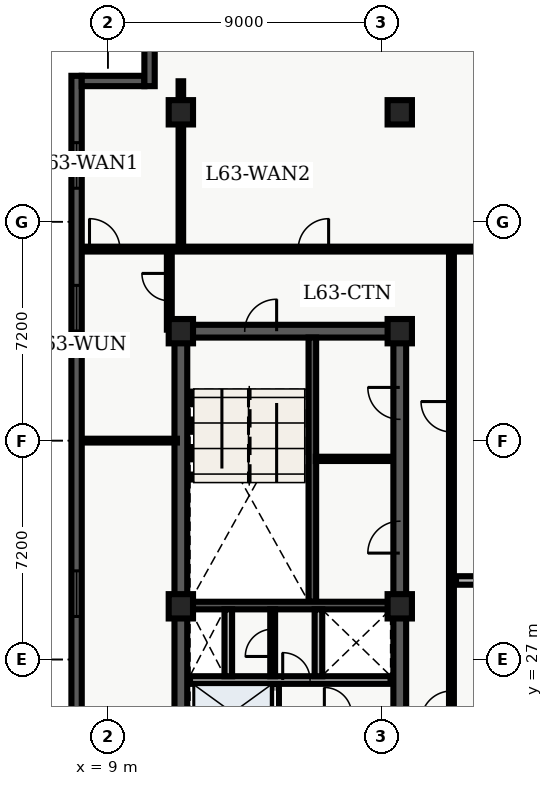
"""IFC4 building model, lengths in metres.
Left out: names, types, materials, properties, quantities, classifications, styles, units other than length and angle.
Written with IfcOpenShell. Run it as: python <this file> out.ifc"""

import sys

from ifc_helpers import new_model, entity, si_unit, converted_unit, direction, frame, origin_with_axes, origin_2d_with_axis, place, context, subcontext, project, spatial, polyline, rectangle, outline, extrude, element, fill, save


model = new_model("IFC4")
c1 = context("Model", 3, precision=1e-05, world=origin_with_axes(), true_north=direction((0.0, 1.0)))
c2 = subcontext(c1, "Body", "Model", "MODEL_VIEW")
j1 = project(units=[si_unit("LENGTHUNIT", "METRE"), converted_unit("PLANEANGLEUNIT", "DEGREE", entity("IfcPlaneAngleMeasure", 0.017), si_unit("PLANEANGLEUNIT", "RADIAN"), dimensions=[0, 0, 0, 0, 0, 0, 0])], contexts=[c1])
p1 = place(None, origin_with_axes())
s1 = spatial("IfcSite", under=j1, at=p1, CompositionType="ELEMENT")
p2 = place(p1, origin_with_axes())
s2 = spatial("IfcBuilding", under=s1, at=p2, CompositionType="ELEMENT")
p3 = place(p2, frame((0.0, 0.0, 256.8), z_axis=(0.0, 0.0, 1.0), x_axis=(1.0, 0.0, 0.0)))
s3 = spatial("IfcBuildingStorey", under=s2, at=p3, CompositionType="ELEMENT", Elevation=256.8)
p4 = place(p3, frame((11.4, 10.8, 0.0), z_axis=(0.0, 0.0, 1.0), x_axis=(0.0, 1.0, 0.0)))
e1 = element("IfcWall", 1, at=p4, inside=s3, PredefinedType="SHEAR", context=c2, shape_type="SweptSolid", body=[
    extrude(outline(polyline([(0.0, -0.21), (27.0, -0.21), (27.0, 0.21), (0.0, 0.21), (0.0, -0.21)])), origin_with_axes(), (0.0, 0.0, 1.0), 3.66),
])
p5 = place(p3, frame((11.4, 37.8, 0.0), z_axis=(0.0, 0.0, 1.0), x_axis=(1.0, 0.0, 0.0)))
e2 = element("IfcWall", 2, at=p5, inside=s3, PredefinedType="SHEAR", context=c2, shape_type="SweptSolid", body=[
    extrude(outline(polyline([(0.0, -0.21), (7.2, -0.21), (7.2, 0.21), (0.0, 0.21), (0.0, -0.21)])), origin_with_axes(), (0.0, 0.0, 1.0), 3.66),
])
p6 = place(p5, frame((2.625, 0.0, 0.0), z_axis=(0.0, 0.0, 1.0), x_axis=(1.0, 0.0, 0.0)))
e3 = element("IfcOpeningElement", 3, at=p6, cuts=e2, PredefinedType="OPENING", context=c2, shape_type="SweptSolid", body=[
    extrude(rectangle(XDim=1.05, YDim=0.44, at=origin_2d_with_axis()), origin_with_axes(), (0.0, 0.0, 1.0), 2.15),
])
p7 = place(p3, frame((18.6, 24.3, 0.0), z_axis=(0.0, 0.0, 1.0), x_axis=(0.0, 1.0, 0.0)))
e4 = element("IfcWall", 4, at=p7, inside=s3, PredefinedType="SHEAR", context=c2, shape_type="SweptSolid", body=[
    extrude(outline(polyline([(0.0, -0.21), (13.5, -0.21), (13.5, 0.21), (0.0, 0.21), (0.0, -0.21)])), origin_with_axes(), (0.0, 0.0, 1.0), 3.66),
])
p8 = place(p7, frame((6.725, 0.0, 0.0), z_axis=(0.0, 0.0, 1.0), x_axis=(1.0, 0.0, 0.0)))
e5 = element("IfcOpeningElement", 5, at=p8, cuts=e4, PredefinedType="OPENING", context=c2, shape_type="SweptSolid", body=[
    extrude(rectangle(XDim=1.05, YDim=0.44, at=origin_2d_with_axis()), origin_with_axes(), (0.0, 0.0, 1.0), 2.15),
])
p9 = place(p7, frame((11.125, 0.0, 0.0), z_axis=(0.0, 0.0, 1.0), x_axis=(1.0, 0.0, 0.0)))
e6 = element("IfcOpeningElement", 6, at=p9, cuts=e4, PredefinedType="OPENING", context=c2, shape_type="SweptSolid", body=[
    extrude(rectangle(XDim=1.05, YDim=0.44, at=origin_2d_with_axis()), origin_with_axes(), (0.0, 0.0, 1.0), 2.15),
])
p10 = place(p3, frame((15.725, 28.9, 0.0), z_axis=(0.0, 0.0, 1.0), x_axis=(0.0, 1.0, 0.0)))
e7 = element("IfcWall", 7, at=p10, inside=s3, PredefinedType="SHEAR", context=c2, shape_type="SweptSolid", body=[
    extrude(outline(polyline([(0.0, -0.125), (8.69, -0.125), (8.69, 0.125), (0.0, 0.125), (0.0, -0.125)])), origin_with_axes(), (0.0, 0.0, 1.0), 3.66),
])
p11 = place(p3, frame((11.61, 28.775, 0.0), z_axis=(0.0, 0.0, 1.0), x_axis=(1.0, 0.0, 0.0)))
e8 = element("IfcWall", 8, at=p11, inside=s3, PredefinedType="SHEAR", context=c2, shape_type="SweptSolid", body=[
    extrude(outline(polyline([(0.0, -0.125), (6.78, -0.125), (6.78, 0.125), (0.0, 0.125), (0.0, -0.125)])), origin_with_axes(), (0.0, 0.0, 1.0), 3.66),
])
p12 = place(p3, frame((14.5, 19.95, 0.0), z_axis=(0.0, 0.0, 1.0), x_axis=(0.0, 1.0, 0.0)))
e9 = element("IfcWall", 9, at=p12, inside=s3, PredefinedType="SOLIDWALL", context=c2, shape_type="SweptSolid", body=[
    extrude(outline(polyline([(0.0, -0.125), (6.25, -0.125), (6.25, 0.125), (0.0, 0.125), (0.0, -0.125)])), origin_with_axes(), (0.0, 0.0, 1.0), 2.7),
])
p13 = place(p12, frame((1.025, 0.0, 0.0), z_axis=(0.0, 0.0, 1.0), x_axis=(1.0, 0.0, 0.0)))
e10 = element("IfcOpeningElement", 10, at=p13, cuts=e9, PredefinedType="OPENING", context=c2, shape_type="SweptSolid", body=[
    extrude(rectangle(XDim=1.1, YDim=0.27, at=origin_2d_with_axis()), origin_with_axes(), (0.0, 0.0, 1.0), 2.15),
])
p14 = place(p12, frame((2.975, 0.0, 0.0), z_axis=(0.0, 0.0, 1.0), x_axis=(1.0, 0.0, 0.0)))
e11 = element("IfcOpeningElement", 11, at=p14, cuts=e9, PredefinedType="OPENING", context=c2, shape_type="SweptSolid", body=[
    extrude(rectangle(XDim=1.1, YDim=0.27, at=origin_2d_with_axis()), origin_with_axes(), (0.0, 0.0, 1.0), 2.15),
])
p15 = place(p12, frame((5.425, 0.0, 0.0), z_axis=(0.0, 0.0, 1.0), x_axis=(1.0, 0.0, 0.0)))
e12 = element("IfcOpeningElement", 12, at=p15, cuts=e9, PredefinedType="OPENING", context=c2, shape_type="SweptSolid", body=[
    extrude(rectangle(XDim=1.2, YDim=0.27, at=origin_2d_with_axis()), origin_with_axes(), (0.0, 0.0, 1.0), 2.15),
])
p16 = place(p3, frame((11.7, 26.325, 0.0), z_axis=(0.0, 0.0, 1.0), x_axis=(1.0, 0.0, 0.0)))
e13 = element("IfcWall", 13, at=p16, inside=s3, PredefinedType="SOLIDWALL", context=c2, shape_type="SweptSolid", body=[
    extrude(outline(polyline([(0.0, -0.125), (6.6, -0.125), (6.6, 0.125), (0.0, 0.125), (0.0, -0.125)])), origin_with_axes(), (0.0, 0.0, 1.0), 2.7),
])
p17 = place(p16, frame((3.5, 0.0, 0.0), z_axis=(0.0, 0.0, 1.0), x_axis=(1.0, 0.0, 0.0)))
e14 = element("IfcOpeningElement", 14, at=p17, cuts=e13, PredefinedType="OPENING", context=c2, shape_type="SweptSolid", body=[
    extrude(rectangle(XDim=0.9, YDim=0.27, at=origin_2d_with_axis()), origin_with_axes(), (0.0, 0.0, 1.0), 2.15),
])
for number, where, z_axis, x_axis in (
    (15, (12.96, 26.45, 0.0), (0.0, 0.0, 1.0), (0.0, 1.0, 0.0)),
    (16, (15.925, 26.45, 0.0), (0.0, 0.0, 1.0), (0.0, 1.0, 0.0)),
):
    element("IfcWall", number, at=place(p3, frame(where, z_axis=z_axis, x_axis=x_axis)), inside=s3, PredefinedType="SOLIDWALL", context=c2, shape_type="SweptSolid", body=[
        extrude(outline(polyline([(0.0, -0.125), (2.2, -0.125), (2.2, 0.125), (0.0, 0.125), (0.0, -0.125)])), origin_with_axes(), (0.0, 0.0, 1.0), 2.7),
    ])
for number, where, z_axis, x_axis in (
    (17, (11.4, 28.75, 0.0), (0.0, 0.0, 1.0), (1.0, 0.0, 0.0)),
    (18, (11.4, 37.8, 0.0), (0.0, 0.0, 1.0), (1.0, 0.0, 0.0)),
    (19, (11.4, 45.0, 0.0), (0.0, 0.0, 1.0), (1.0, 0.0, 0.0)),
    (20, (18.6, 28.75, 0.0), (0.0, 0.0, 1.0), (1.0, 0.0, 0.0)),
    (21, (18.6, 37.8, 0.0), (0.0, 0.0, 1.0), (1.0, 0.0, 0.0)),
    (22, (18.6, 45.0, 0.0), (0.0, 0.0, 1.0), (1.0, 0.0, 0.0)),
):
    element("IfcColumn", number, at=place(p3, frame(where, z_axis=z_axis, x_axis=x_axis)), inside=s3, PredefinedType="COLUMN", context=c2, shape_type="SweptSolid", body=[
        extrude(rectangle(XDim=0.8, YDim=0.8, at=origin_2d_with_axis()), origin_with_axes(), (0.0, 0.0, 1.0), 3.9),
    ])
p18 = place(p3, frame((14.42, 26.45, 0.0), z_axis=(0.0, 0.0, 1.0), x_axis=(0.0, 1.0, 0.0)))
e23 = element("IfcWall", 23, at=p18, inside=s3, PredefinedType="PARTITIONING", context=c2, shape_type="SweptSolid", body=[
    extrude(outline(polyline([(0.0, -0.08), (2.2, -0.08), (2.2, 0.08), (0.0, 0.08), (0.0, -0.08)])), origin_with_axes(), (0.0, 0.0, 1.0), 2.7),
])
p19 = place(p18, frame((1.1, 0.0, 0.0), z_axis=(0.0, 0.0, 1.0), x_axis=(1.0, 0.0, 0.0)))
e24 = element("IfcOpeningElement", 24, at=p19, cuts=e23, PredefinedType="OPENING", context=c2, shape_type="SweptSolid", body=[
    extrude(rectangle(XDim=0.9, YDim=0.18, at=origin_2d_with_axis()), origin_with_axes(), (0.0, 0.0, 1.0), 2.15),
])
p20 = place(p3, frame((15.84, 33.6, 0.0), z_axis=(0.0, 0.0, 1.0), x_axis=(1.0, 0.0, 0.0)))
e25 = element("IfcWall", 25, at=p20, inside=s3, PredefinedType="PARTITIONING", context=c2, shape_type="SweptSolid", body=[
    extrude(outline(polyline([(0.0, -0.07), (2.46, -0.07), (2.46, 0.07), (0.0, 0.07), (0.0, -0.07)])), origin_with_axes(), (0.0, 0.0, 1.0), 2.7),
])
p21 = place(p3, frame((8.135, 40.5, 0.0), z_axis=(0.0, 0.0, 1.0), x_axis=(1.0, 0.0, 0.0)))
e26 = element("IfcWall", 26, at=p21, inside=s3, PredefinedType="PARTITIONING", context=c2, shape_type="SweptSolid", body=[
    extrude(outline(polyline([(0.0, -0.08), (23.93, -0.08), (23.93, 0.08), (0.0, 0.08), (0.0, -0.08)])), origin_with_axes(), (0.0, 0.0, 1.0), 2.7),
])
p22 = place(p21, frame((0.76, 0.0, 0.0), z_axis=(0.0, 0.0, 1.0), x_axis=(1.0, 0.0, 0.0)))
e27 = element("IfcOpeningElement", 27, at=p22, cuts=e26, PredefinedType="OPENING", context=c2, shape_type="SweptSolid", body=[
    extrude(rectangle(XDim=1.0, YDim=0.18, at=origin_2d_with_axis()), origin_with_axes(), (0.0, 0.0, 1.0), 2.15),
])
p23 = place(p21, frame((7.625, 0.0, 0.0), z_axis=(0.0, 0.0, 1.0), x_axis=(1.0, 0.0, 0.0)))
e28 = element("IfcOpeningElement", 28, at=p23, cuts=e26, PredefinedType="OPENING", context=c2, shape_type="SweptSolid", body=[
    extrude(rectangle(XDim=1.0, YDim=0.18, at=origin_2d_with_axis()), origin_with_axes(), (0.0, 0.0, 1.0), 2.15),
])
p24 = place(p3, frame((20.3, 7.8, 0.0), z_axis=(0.0, 0.0, 1.0), x_axis=(0.0, 1.0, 0.0)))
e29 = element("IfcWall", 29, at=p24, inside=s3, PredefinedType="PARTITIONING", context=c2, shape_type="SweptSolid", body=[
    extrude(outline(polyline([(0.0, -0.08), (32.7, -0.08), (32.7, 0.08), (0.0, 0.08), (0.0, -0.08)])), origin_with_axes(), (0.0, 0.0, 1.0), 2.7),
])
p25 = place(p24, frame((17.665, 0.0, 0.0), z_axis=(0.0, 0.0, 1.0), x_axis=(1.0, 0.0, 0.0)))
e30 = element("IfcOpeningElement", 30, at=p25, cuts=e29, PredefinedType="OPENING", context=c2, shape_type="SweptSolid", body=[
    extrude(rectangle(XDim=1.0, YDim=0.18, at=origin_2d_with_axis()), origin_with_axes(), (0.0, 0.0, 1.0), 2.15),
])
p26 = place(p24, frame((27.185, 0.0, 0.0), z_axis=(0.0, 0.0, 1.0), x_axis=(1.0, 0.0, 0.0)))
e31 = element("IfcOpeningElement", 31, at=p26, cuts=e29, PredefinedType="OPENING", context=c2, shape_type="SweptSolid", body=[
    extrude(rectangle(XDim=1.0, YDim=0.18, at=origin_2d_with_axis()), origin_with_axes(), (0.0, 0.0, 1.0), 2.15),
])
p27 = place(p24, frame((5.775, 0.0, 0.0), z_axis=(0.0, 0.0, 1.0), x_axis=(1.0, 0.0, 0.0)))
e32 = element("IfcOpeningElement", 32, at=p27, cuts=e29, PredefinedType="OPENING", context=c2, shape_type="SweptSolid", body=[
    extrude(rectangle(XDim=1.05, YDim=0.18, at=origin_2d_with_axis()), origin_with_axes(), (0.0, 0.0, 1.0), 2.15),
])
p28 = place(p3, frame((11.02, 37.85, 0.0), z_axis=(0.0, 0.0, 1.0), x_axis=(0.0, 1.0, 0.0)))
e33 = element("IfcWall", 33, at=p28, inside=s3, PredefinedType="PARTITIONING", context=c2, shape_type="SweptSolid", body=[
    extrude(outline(polyline([(0.0, -0.08), (2.65, -0.08), (2.65, 0.08), (0.0, 0.08), (0.0, -0.08)])), origin_with_axes(), (0.0, 0.0, 1.0), 2.7),
])
p29 = place(p28, frame((1.4, 0.0, 0.0), z_axis=(0.0, 0.0, 1.0), x_axis=(1.0, 0.0, 0.0)))
e34 = element("IfcOpeningElement", 34, at=p29, cuts=e33, PredefinedType="OPENING", context=c2, shape_type="SweptSolid", body=[
    extrude(rectangle(XDim=0.9, YDim=0.18, at=origin_2d_with_axis()), origin_with_axes(), (0.0, 0.0, 1.0), 2.15),
])
p30 = place(p3, frame((8.135, 34.2, 0.0), z_axis=(0.0, 0.0, 1.0), x_axis=(1.0, 0.0, 0.0)))
e35 = element("IfcWall", 35, at=p30, inside=s3, PredefinedType="PARTITIONING", context=c2, shape_type="SweptSolid", body=[
    extrude(outline(polyline([(0.0, -0.062), (3.135, -0.062), (3.135, 0.062), (0.0, 0.062), (0.0, -0.062)])), origin_with_axes(), (0.0, 0.0, 1.0), 2.7),
])
p31 = place(p3, frame((11.4, 40.6, 0.0), z_axis=(0.0, 0.0, 1.0), x_axis=(0.0, 1.0, 0.0)))
e36 = element("IfcWall", 36, at=p31, inside=s3, PredefinedType="PARTITIONING", context=c2, shape_type="SweptSolid", body=[
    extrude(outline(polyline([(0.0, -0.075), (5.42, -0.075), (5.42, 0.075), (0.0, 0.075), (0.0, -0.075)])), origin_with_axes(), (0.0, 0.0, 1.0), 2.7),
])
p32 = place(p3, frame((20.45, 29.6, 0.0), z_axis=(0.0, 0.0, 1.0), x_axis=(1.0, 0.0, 0.0)))
e37 = element("IfcWall", 37, at=p32, inside=s3, PredefinedType="PARTITIONING", context=c2, shape_type="SweptSolid", body=[
    extrude(outline(polyline([(0.0, -0.14), (11.615, -0.14), (11.615, 0.14), (0.0, 0.14), (0.0, -0.14)])), origin_with_axes(), (0.0, 0.0, 1.0), 2.7),
])
p33 = place(p3, frame((7.97, 2.74, 0.0), z_axis=(0.0, 0.0, 1.0), x_axis=(0.0, 1.0, 0.0)))
e38 = element("IfcWall", 38, at=p33, inside=s3, PredefinedType="SOLIDWALL", context=c2, shape_type="SweptSolid", body=[
    extrude(outline(polyline([(0.0, -0.17), (43.46, -0.17), (43.46, 0.17), (0.0, 0.17), (0.0, -0.17)])), origin_with_axes(), (0.0, 0.0, 1.0), 3.66),
])
p34 = place(p33, frame((2.948, 0.0, 0.45), z_axis=(0.0, 0.0, 1.0), x_axis=(1.0, 0.0, 0.0)))
e39 = element("IfcOpeningElement", 39, at=p34, cuts=e38, PredefinedType="OPENING", context=c2, shape_type="SweptSolid", body=[
    extrude(rectangle(XDim=1.5, YDim=0.36, at=origin_2d_with_axis()), origin_with_axes(), (0.0, 0.0, 1.0), 2.1),
])
p35 = place(p33, frame((7.643, 0.0, 0.45), z_axis=(0.0, 0.0, 1.0), x_axis=(1.0, 0.0, 0.0)))
e40 = element("IfcOpeningElement", 40, at=p35, cuts=e38, PredefinedType="OPENING", context=c2, shape_type="SweptSolid", body=[
    extrude(rectangle(XDim=1.5, YDim=0.36, at=origin_2d_with_axis()), origin_with_axes(), (0.0, 0.0, 1.0), 2.1),
])
p36 = place(p33, frame((13.189, 0.0, 0.45), z_axis=(0.0, 0.0, 1.0), x_axis=(1.0, 0.0, 0.0)))
e41 = element("IfcOpeningElement", 41, at=p36, cuts=e38, PredefinedType="OPENING", context=c2, shape_type="SweptSolid", body=[
    extrude(rectangle(XDim=1.5, YDim=0.36, at=origin_2d_with_axis()), origin_with_axes(), (0.0, 0.0, 1.0), 2.1),
])
p37 = place(p33, frame((17.034, 0.0, 0.45), z_axis=(0.0, 0.0, 1.0), x_axis=(1.0, 0.0, 0.0)))
e42 = element("IfcOpeningElement", 42, at=p37, cuts=e38, PredefinedType="OPENING", context=c2, shape_type="SweptSolid", body=[
    extrude(rectangle(XDim=1.5, YDim=0.36, at=origin_2d_with_axis()), origin_with_axes(), (0.0, 0.0, 1.0), 2.1),
])
p38 = place(p33, frame((21.73, 0.0, 0.45), z_axis=(0.0, 0.0, 1.0), x_axis=(1.0, 0.0, 0.0)))
e43 = element("IfcOpeningElement", 43, at=p38, cuts=e38, PredefinedType="OPENING", context=c2, shape_type="SweptSolid", body=[
    extrude(rectangle(XDim=1.5, YDim=0.36, at=origin_2d_with_axis()), origin_with_axes(), (0.0, 0.0, 1.0), 2.1),
])
p39 = place(p33, frame((26.426, 0.0, 0.45), z_axis=(0.0, 0.0, 1.0), x_axis=(1.0, 0.0, 0.0)))
e44 = element("IfcOpeningElement", 44, at=p39, cuts=e38, PredefinedType="OPENING", context=c2, shape_type="SweptSolid", body=[
    extrude(rectangle(XDim=1.5, YDim=0.36, at=origin_2d_with_axis()), origin_with_axes(), (0.0, 0.0, 1.0), 2.1),
])
p40 = place(p33, frame((35.817, 0.0, 0.45), z_axis=(0.0, 0.0, 1.0), x_axis=(1.0, 0.0, 0.0)))
e45 = element("IfcOpeningElement", 45, at=p40, cuts=e38, PredefinedType="OPENING", context=c2, shape_type="SweptSolid", body=[
    extrude(rectangle(XDim=1.5, YDim=0.36, at=origin_2d_with_axis()), origin_with_axes(), (0.0, 0.0, 1.0), 2.1),
])
p41 = place(p33, frame((40.512, 0.0, 0.45), z_axis=(0.0, 0.0, 1.0), x_axis=(1.0, 0.0, 0.0)))
e46 = element("IfcOpeningElement", 46, at=p41, cuts=e38, PredefinedType="OPENING", context=c2, shape_type="SweptSolid", body=[
    extrude(rectangle(XDim=1.5, YDim=0.36, at=origin_2d_with_axis()), origin_with_axes(), (0.0, 0.0, 1.0), 2.1),
])
p42 = place(p3, frame((8.14, 46.03, 0.0), z_axis=(0.0, 0.0, 1.0), x_axis=(1.0, 0.0, 0.0)))
e47 = element("IfcWall", 47, at=p42, inside=s3, PredefinedType="SOLIDWALL", context=c2, shape_type="SweptSolid", body=[
    extrude(outline(polyline([(0.0, -0.17), (2.06, -0.17), (2.06, 0.17), (0.0, 0.17), (0.0, -0.17)])), origin_with_axes(), (0.0, 0.0, 1.0), 3.66),
])
p43 = place(p3, frame((10.37, 45.86, 0.0), z_axis=(0.0, 0.0, 1.0), x_axis=(0.0, 1.0, 0.0)))
e48 = element("IfcWall", 48, at=p43, inside=s3, PredefinedType="SOLIDWALL", context=c2, shape_type="SweptSolid", body=[
    extrude(outline(polyline([(0.0, -0.17), (2.74, -0.17), (2.74, 0.17), (0.0, 0.17), (0.0, -0.17)])), origin_with_axes(), (0.0, 0.0, 1.0), 3.66),
])
p44 = place(p12, frame((5.425, 0.0, 0.0), z_axis=(0.0, 0.0, 1.0), x_axis=(1.0, 0.0, 0.0)))
e49 = element("IfcDoor", 49, at=p44, inside=s3, OperationType="DOUBLE_DOOR_SLIDING", PredefinedType="DOOR", context=c2, shape_type="SweptSolid", body=[
    extrude(rectangle(XDim=1.2, YDim=0.09, at=origin_2d_with_axis()), origin_with_axes(), (0.0, 0.0, 1.0), 2.15),
])
fill(e12, e49)
p45 = place(p5, frame((2.625, 0.0, 0.0), z_axis=(0.0, 0.0, 1.0), x_axis=(1.0, 0.0, 0.0)))
e50 = element("IfcDoor", 50, at=p45, inside=s3, OperationType="SINGLE_SWING_RIGHT", PredefinedType="DOOR", context=c2, shape_type="SweptSolid", body=[
    extrude(rectangle(XDim=1.05, YDim=0.09, at=origin_2d_with_axis()), origin_with_axes(), (0.0, 0.0, 1.0), 2.15),
])
fill(e3, e50)
p46 = place(p16, frame((3.5, 0.0, 0.0), z_axis=(0.0, 0.0, 1.0), x_axis=(1.0, 0.0, 0.0)))
e51 = element("IfcDoor", 51, at=p46, inside=s3, OperationType="SINGLE_SWING_LEFT", PredefinedType="DOOR", context=c2, shape_type="SweptSolid", body=[
    extrude(rectangle(XDim=0.9, YDim=0.09, at=origin_2d_with_axis()), origin_with_axes(), (0.0, 0.0, 1.0), 2.15),
])
fill(e14, e51)
p47 = place(p18, frame((1.1, 0.0, 0.0), z_axis=(0.0, 0.0, 1.0), x_axis=(1.0, 0.0, 0.0)))
e52 = element("IfcDoor", 52, at=p47, inside=s3, OperationType="SINGLE_SWING_LEFT", PredefinedType="DOOR", context=c2, shape_type="SweptSolid", body=[
    extrude(rectangle(XDim=0.9, YDim=0.09, at=origin_2d_with_axis()), origin_with_axes(), (0.0, 0.0, 1.0), 2.15),
])
fill(e24, e52)
p48 = place(p7, frame((6.725, 0.0, 0.0), z_axis=(0.0, 0.0, 1.0), x_axis=(1.0, 0.0, 0.0)))
e53 = element("IfcDoor", 53, at=p48, inside=s3, OperationType="SINGLE_SWING_LEFT", PredefinedType="DOOR", context=c2, shape_type="SweptSolid", body=[
    extrude(rectangle(XDim=1.05, YDim=0.09, at=origin_2d_with_axis()), origin_with_axes(), (0.0, 0.0, 1.0), 2.15),
])
fill(e5, e53)
p49 = place(p7, frame((11.125, 0.0, 0.0), z_axis=(0.0, 0.0, 1.0), x_axis=(1.0, 0.0, 0.0)))
e54 = element("IfcDoor", 54, at=p49, inside=s3, OperationType="SINGLE_SWING_RIGHT", PredefinedType="DOOR", context=c2, shape_type="SweptSolid", body=[
    extrude(rectangle(XDim=1.05, YDim=0.09, at=origin_2d_with_axis()), origin_with_axes(), (0.0, 0.0, 1.0), 2.15),
])
fill(e6, e54)
p50 = place(p28, frame((1.4, 0.0, 0.0), z_axis=(0.0, 0.0, 1.0), x_axis=(1.0, 0.0, 0.0)))
e55 = element("IfcDoor", 55, at=p50, inside=s3, OperationType="SINGLE_SWING_RIGHT", PredefinedType="DOOR", context=c2, shape_type="SweptSolid", body=[
    extrude(rectangle(XDim=0.9, YDim=0.09, at=origin_2d_with_axis()), origin_with_axes(), (0.0, 0.0, 1.0), 2.15),
])
fill(e34, e55)
p51 = place(p21, frame((0.76, 0.0, 0.0), z_axis=(0.0, 0.0, 1.0), x_axis=(1.0, 0.0, 0.0)))
e56 = element("IfcDoor", 56, at=p51, inside=s3, OperationType="SINGLE_SWING_LEFT", PredefinedType="DOOR", context=c2, shape_type="SweptSolid", body=[
    extrude(rectangle(XDim=1.0, YDim=0.09, at=origin_2d_with_axis()), origin_with_axes(), (0.0, 0.0, 1.0), 2.15),
])
fill(e27, e56)
p52 = place(p21, frame((7.625, 0.0, 0.0), z_axis=(0.0, 0.0, 1.0), x_axis=(1.0, 0.0, 0.0)))
e57 = element("IfcDoor", 57, at=p52, inside=s3, OperationType="SINGLE_SWING_RIGHT", PredefinedType="DOOR", context=c2, shape_type="SweptSolid", body=[
    extrude(rectangle(XDim=1.0, YDim=0.09, at=origin_2d_with_axis()), origin_with_axes(), (0.0, 0.0, 1.0), 2.15),
])
fill(e28, e57)
p53 = place(p24, frame((17.665, 0.0, 0.0), z_axis=(0.0, 0.0, 1.0), x_axis=(1.0, 0.0, 0.0)))
e58 = element("IfcDoor", 58, at=p53, inside=s3, OperationType="SINGLE_SWING_LEFT", PredefinedType="DOOR", context=c2, shape_type="SweptSolid", body=[
    extrude(rectangle(XDim=1.0, YDim=0.09, at=origin_2d_with_axis()), origin_with_axes(), (0.0, 0.0, 1.0), 2.15),
])
fill(e30, e58)
p54 = place(p24, frame((27.185, 0.0, 0.0), z_axis=(0.0, 0.0, 1.0), x_axis=(1.0, 0.0, 0.0)))
e59 = element("IfcDoor", 59, at=p54, inside=s3, OperationType="SINGLE_SWING_RIGHT", PredefinedType="DOOR", context=c2, shape_type="SweptSolid", body=[
    extrude(rectangle(XDim=1.0, YDim=0.09, at=origin_2d_with_axis()), origin_with_axes(), (0.0, 0.0, 1.0), 2.15),
])
fill(e31, e59)
p55 = place(p33, frame((26.426, 0.0, 0.45), z_axis=(0.0, 0.0, 1.0), x_axis=(1.0, 0.0, 0.0)))
e60 = element("IfcWindow", 60, at=p55, inside=s3, PredefinedType="WINDOW", context=c2, shape_type="SweptSolid", body=[
    extrude(rectangle(XDim=1.5, YDim=0.09, at=origin_2d_with_axis()), origin_with_axes(), (0.0, 0.0, 1.0), 2.1),
])
fill(e44, e60)
p56 = place(p33, frame((35.817, 0.0, 0.45), z_axis=(0.0, 0.0, 1.0), x_axis=(1.0, 0.0, 0.0)))
e61 = element("IfcWindow", 61, at=p56, inside=s3, PredefinedType="WINDOW", context=c2, shape_type="SweptSolid", body=[
    extrude(rectangle(XDim=1.5, YDim=0.09, at=origin_2d_with_axis()), origin_with_axes(), (0.0, 0.0, 1.0), 2.1),
])
fill(e45, e61)
p57 = place(p33, frame((40.512, 0.0, 0.45), z_axis=(0.0, 0.0, 1.0), x_axis=(1.0, 0.0, 0.0)))
e62 = element("IfcWindow", 62, at=p57, inside=s3, PredefinedType="WINDOW", context=c2, shape_type="SweptSolid", body=[
    extrude(rectangle(XDim=1.5, YDim=0.09, at=origin_2d_with_axis()), origin_with_axes(), (0.0, 0.0, 1.0), 2.1),
])
fill(e46, e62)
save(model, sys.argv[1])
